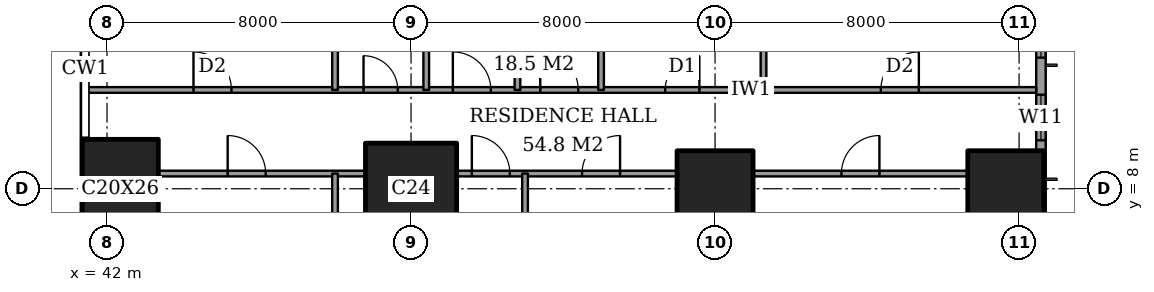
"""IFC4 building model, lengths in metres.
Left out: names, types, materials, properties, quantities, classifications, styles, units other than length and angle.
Written with IfcOpenShell. Run it as: python <this file> out.ifc"""

import sys

from ifc_helpers import new_model, si_unit, direction, frame, frame_2d, origin, origin_2d, place, context, subcontext, project, spatial, rectangle, extrude, element, fill, save


model = new_model("IFC4")
c1 = context("Model", 3, precision=1e-05, world=origin(), true_north=direction((0.0, 1.0)))
c2 = subcontext(c1, "Body", "Model", "MODEL_VIEW")
j1 = project(units=[si_unit("LENGTHUNIT", "METRE"), si_unit("PLANEANGLEUNIT", "RADIAN")], contexts=[c1])
p1 = place(None, origin())
s1 = spatial("IfcSite", under=j1, at=p1, CompositionType="ELEMENT")
p2 = place(p1, origin())
s2 = spatial("IfcBuilding", under=s1, at=p2, CompositionType="ELEMENT")
p3 = place(p2, frame((0.0, 0.0, 135.8)))
s3 = spatial("IfcBuildingStorey", under=s2, at=p3, CompositionType="ELEMENT", Elevation=135.8)
p4 = place(p3, frame((42.35, 8.0, 0.0), z_axis=(0.0, 0.0, 1.0), x_axis=(1.0, 0.0, 0.0)))
e1 = element("IfcColumn", 1, at=p4, inside=s3, PredefinedType="COLUMN", context=c2, shape_type="SweptSolid", body=[
    extrude(rectangle(XDim=2.0, YDim=2.6, at=origin_2d()), origin(), (0.0, 0.0, 1.0), 3.6),
])
p5 = place(p3, frame((50.0, 8.0, 0.0), z_axis=(0.0, 0.0, 1.0), x_axis=(1.0, 0.0, 0.0)))
e2 = element("IfcColumn", 2, at=p5, inside=s3, PredefinedType="COLUMN", context=c2, shape_type="SweptSolid", body=[
    extrude(rectangle(XDim=2.4, YDim=2.4, at=origin_2d()), origin(), (0.0, 0.0, 1.0), 3.6),
])
for number, where, z_axis, x_axis in (
    (3, (58.0, 8.0, 0.0), (0.0, 0.0, 1.0), (1.0, 0.0, 0.0)),
    (4, (65.65, 8.0, 0.0), (0.0, 0.0, 1.0), (1.0, 0.0, 0.0)),
):
    element("IfcColumn", number, at=place(p3, frame(where, z_axis=z_axis, x_axis=x_axis)), inside=s3, PredefinedType="COLUMN", context=c2, shape_type="SweptSolid", body=[
        extrude(rectangle(XDim=2.0, YDim=2.0, at=origin_2d()), origin(), (0.0, 0.0, 1.0), 3.6),
    ])
p6 = place(p3, frame((66.575, 3.175, 0.0), z_axis=(0.0, 0.0, 1.0), x_axis=(0.0, 1.0, 0.0)))
e5 = element("IfcWall", 5, at=p6, inside=s3, PredefinedType="SOLIDWALL", context=c2, shape_type="SweptSolid", body=[
    extrude(rectangle(XDim=41.65, YDim=0.25, at=frame_2d((20.825, 0.0))), origin(), (0.0, 0.0, 1.0), 3.6),
])
p7 = place(p6, frame((0.775, 0.0, 0.4)))
e6 = element("IfcOpeningElement", 6, at=p7, cuts=e5, PredefinedType="OPENING", context=c2, shape_type="SweptSolid", body=[
    extrude(rectangle(XDim=2.4, YDim=2.2, at=frame_2d((1.2, 1.1))), frame((0.0, 0.135, 0.0), z_axis=(0.0, -1.0, 0.0), x_axis=(1.0, 0.0, 0.0)), (0.0, 0.0, 1.0), 0.27),
])
p8 = place(p6, frame((6.1, 0.0, 0.4)))
e7 = element("IfcOpeningElement", 7, at=p8, cuts=e5, PredefinedType="OPENING", context=c2, shape_type="SweptSolid", body=[
    extrude(rectangle(XDim=1.2, YDim=2.2, at=frame_2d((0.6, 1.1))), frame((0.0, 0.135, 0.0), z_axis=(0.0, -1.0, 0.0), x_axis=(1.0, 0.0, 0.0)), (0.0, 0.0, 1.0), 0.27),
])
p9 = place(p6, frame((8.275, 0.0, 0.4)))
e8 = element("IfcOpeningElement", 8, at=p9, cuts=e5, PredefinedType="OPENING", context=c2, shape_type="SweptSolid", body=[
    extrude(rectangle(XDim=2.4, YDim=2.2, at=frame_2d((1.2, 1.1))), frame((0.0, 0.135, 0.0), z_axis=(0.0, -1.0, 0.0), x_axis=(1.0, 0.0, 0.0)), (0.0, 0.0, 1.0), 0.27),
])
p10 = place(p6, frame((15.775, 0.0, 0.4)))
e9 = element("IfcOpeningElement", 9, at=p10, cuts=e5, PredefinedType="OPENING", context=c2, shape_type="SweptSolid", body=[
    extrude(rectangle(XDim=2.4, YDim=2.2, at=frame_2d((1.2, 1.1))), frame((0.0, 0.135, 0.0), z_axis=(0.0, -1.0, 0.0), x_axis=(1.0, 0.0, 0.0)), (0.0, 0.0, 1.0), 0.27),
])
p11 = place(p6, frame((23.475, 0.0, 0.4)))
e10 = element("IfcOpeningElement", 10, at=p11, cuts=e5, PredefinedType="OPENING", context=c2, shape_type="SweptSolid", body=[
    extrude(rectangle(XDim=2.4, YDim=2.2, at=frame_2d((1.2, 1.1))), frame((0.0, 0.135, 0.0), z_axis=(0.0, -1.0, 0.0), x_axis=(1.0, 0.0, 0.0)), (0.0, 0.0, 1.0), 0.27),
])
p12 = place(p6, frame((30.975, 0.0, 0.4)))
e11 = element("IfcOpeningElement", 11, at=p12, cuts=e5, PredefinedType="OPENING", context=c2, shape_type="SweptSolid", body=[
    extrude(rectangle(XDim=2.4, YDim=2.2, at=frame_2d((1.2, 1.1))), frame((0.0, 0.135, 0.0), z_axis=(0.0, -1.0, 0.0), x_axis=(1.0, 0.0, 0.0)), (0.0, 0.0, 1.0), 0.27),
])
p13 = place(p6, frame((34.5, 0.0, 0.4)))
e12 = element("IfcOpeningElement", 12, at=p13, cuts=e5, PredefinedType="OPENING", context=c2, shape_type="SweptSolid", body=[
    extrude(rectangle(XDim=1.2, YDim=2.2, at=frame_2d((0.6, 1.1))), frame((0.0, 0.135, 0.0), z_axis=(0.0, -1.0, 0.0), x_axis=(1.0, 0.0, 0.0)), (0.0, 0.0, 1.0), 0.27),
])
p14 = place(p6, frame((38.475, 0.0, 0.4)))
e13 = element("IfcOpeningElement", 13, at=p14, cuts=e5, PredefinedType="OPENING", context=c2, shape_type="SweptSolid", body=[
    extrude(rectangle(XDim=2.4, YDim=2.2, at=frame_2d((1.2, 1.1))), frame((0.0, 0.135, 0.0), z_axis=(0.0, -1.0, 0.0), x_axis=(1.0, 0.0, 0.0)), (0.0, 0.0, 1.0), 0.27),
])
p15 = place(p3, frame((43.35, 8.4, 0.0), z_axis=(0.0, 0.0, 1.0), x_axis=(1.0, 0.0, 0.0)))
e14 = element("IfcWall", 14, at=p15, inside=s3, PredefinedType="PARTITIONING", context=c2, shape_type="SweptSolid", body=[
    extrude(rectangle(XDim=5.45, YDim=0.15, at=frame_2d((2.725, 0.0))), origin(), (0.0, 0.0, 1.0), 3.35),
])
p16 = place(p15, frame((1.825, 0.0, 0.0)))
e15 = element("IfcOpeningElement", 15, at=p16, cuts=e14, PredefinedType="OPENING", context=c2, shape_type="SweptSolid", body=[
    extrude(rectangle(XDim=1.0, YDim=2.1, at=frame_2d((0.5, 1.05))), frame((0.0, 0.085, 0.0), z_axis=(0.0, -1.0, 0.0), x_axis=(1.0, 0.0, 0.0)), (0.0, 0.0, 1.0), 0.17),
])
p17 = place(p3, frame((51.2, 8.4, 0.0), z_axis=(0.0, 0.0, 1.0), x_axis=(1.0, 0.0, 0.0)))
e16 = element("IfcWall", 16, at=p17, inside=s3, PredefinedType="PARTITIONING", context=c2, shape_type="SweptSolid", body=[
    extrude(rectangle(XDim=5.8, YDim=0.15, at=frame_2d((2.9, 0.0))), origin(), (0.0, 0.0, 1.0), 3.35),
])
p18 = place(p17, frame((3.3, 0.0, 0.0)))
e17 = element("IfcOpeningElement", 17, at=p18, cuts=e16, PredefinedType="OPENING", context=c2, shape_type="SweptSolid", body=[
    extrude(rectangle(XDim=1.0, YDim=2.1, at=frame_2d((0.5, 1.05))), frame((0.0, 0.085, 0.0), z_axis=(0.0, -1.0, 0.0), x_axis=(1.0, 0.0, 0.0)), (0.0, 0.0, 1.0), 0.17),
])
p19 = place(p17, frame((0.4, 0.0, 0.0)))
e18 = element("IfcOpeningElement", 18, at=p19, cuts=e16, PredefinedType="OPENING", context=c2, shape_type="SweptSolid", body=[
    extrude(rectangle(XDim=1.0, YDim=2.1, at=frame_2d((0.5, 1.05))), frame((0.0, 0.085, 0.0), z_axis=(0.0, -1.0, 0.0), x_axis=(1.0, 0.0, 0.0)), (0.0, 0.0, 1.0), 0.17),
])
p20 = place(p3, frame((59.0, 8.4, 0.0), z_axis=(0.0, 0.0, 1.0), x_axis=(1.0, 0.0, 0.0)))
e19 = element("IfcWall", 19, at=p20, inside=s3, PredefinedType="PARTITIONING", context=c2, shape_type="SweptSolid", body=[
    extrude(rectangle(XDim=5.65, YDim=0.15, at=frame_2d((2.825, 0.0))), origin(), (0.0, 0.0, 1.0), 3.35),
])
p21 = place(p20, frame((2.325, 0.0, 0.0)))
e20 = element("IfcOpeningElement", 20, at=p21, cuts=e19, PredefinedType="OPENING", context=c2, shape_type="SweptSolid", body=[
    extrude(rectangle(XDim=1.0, YDim=2.1, at=frame_2d((0.5, 1.05))), frame((0.0, 0.085, 0.0), z_axis=(0.0, -1.0, 0.0), x_axis=(1.0, 0.0, 0.0)), (0.0, 0.0, 1.0), 0.17),
])
p22 = place(p3, frame((41.439, 10.6, 0.0), z_axis=(0.0, 0.0, 1.0), x_axis=(1.0, 0.0, 0.0)))
e21 = element("IfcWall", 21, at=p22, inside=s3, PredefinedType="PARTITIONING", context=c2, shape_type="SweptSolid", body=[
    extrude(rectangle(XDim=25.011, YDim=0.15, at=frame_2d((12.505, 0.0))), origin(), (0.0, 0.0, 1.0), 3.35),
])
p23 = place(p22, frame((11.961, 0.0, 0.0)))
e22 = element("IfcOpeningElement", 22, at=p23, cuts=e21, PredefinedType="OPENING", context=c2, shape_type="SweptSolid", body=[
    extrude(rectangle(XDim=1.0, YDim=2.1, at=frame_2d((0.5, 1.05))), frame((0.0, 0.085, 0.0), z_axis=(0.0, -1.0, 0.0), x_axis=(1.0, 0.0, 0.0)), (0.0, 0.0, 1.0), 0.17),
])
p24 = place(p22, frame((20.924, 0.0, 0.0)))
e23 = element("IfcOpeningElement", 23, at=p24, cuts=e21, PredefinedType="OPENING", context=c2, shape_type="SweptSolid", body=[
    extrude(rectangle(XDim=1.0, YDim=2.1, at=frame_2d((0.5, 1.05))), frame((0.0, 0.085, 0.0), z_axis=(0.0, -1.0, 0.0), x_axis=(1.0, 0.0, 0.0)), (0.0, 0.0, 1.0), 0.17),
])
p25 = place(p22, frame((15.249, 0.0, 0.0)))
e24 = element("IfcOpeningElement", 24, at=p25, cuts=e21, PredefinedType="OPENING", context=c2, shape_type="SweptSolid", body=[
    extrude(rectangle(XDim=0.9, YDim=2.1, at=frame_2d((0.45, 1.05))), frame((0.0, 0.085, 0.0), z_axis=(0.0, -1.0, 0.0), x_axis=(1.0, 0.0, 0.0)), (0.0, 0.0, 1.0), 0.17),
])
p26 = place(p22, frame((9.661, 0.0, 0.0)))
e25 = element("IfcOpeningElement", 25, at=p26, cuts=e21, PredefinedType="OPENING", context=c2, shape_type="SweptSolid", body=[
    extrude(rectangle(XDim=1.0, YDim=2.1, at=frame_2d((0.5, 1.05))), frame((0.0, 0.085, 0.0), z_axis=(0.0, -1.0, 0.0), x_axis=(1.0, 0.0, 0.0)), (0.0, 0.0, 1.0), 0.17),
])
p27 = place(p22, frame((7.311, 0.0, 0.0)))
e26 = element("IfcOpeningElement", 26, at=p27, cuts=e21, PredefinedType="OPENING", context=c2, shape_type="SweptSolid", body=[
    extrude(rectangle(XDim=0.9, YDim=2.1, at=frame_2d((0.45, 1.05))), frame((0.0, 0.085, 0.0), z_axis=(0.0, -1.0, 0.0), x_axis=(1.0, 0.0, 0.0)), (0.0, 0.0, 1.0), 0.17),
])
p28 = place(p22, frame((2.836, 0.0, 0.0)))
e27 = element("IfcOpeningElement", 27, at=p28, cuts=e21, PredefinedType="OPENING", context=c2, shape_type="SweptSolid", body=[
    extrude(rectangle(XDim=1.0, YDim=2.1, at=frame_2d((0.5, 1.05))), frame((0.0, 0.085, 0.0), z_axis=(0.0, -1.0, 0.0), x_axis=(1.0, 0.0, 0.0)), (0.0, 0.0, 1.0), 0.17),
])
p29 = place(p3, frame((48.0, -0.45, 0.0), z_axis=(0.0, 0.0, 1.0), x_axis=(0.0, 1.0, 0.0)))
e28 = element("IfcWall", 28, at=p29, inside=s3, PredefinedType="PARTITIONING", context=c2, shape_type="SweptSolid", body=[
    extrude(rectangle(XDim=8.85, YDim=0.15, at=frame_2d((4.425, 0.0))), origin(), (0.0, 0.0, 1.0), 3.35),
])
p30 = place(p3, frame((48.0, 10.6, 0.0), z_axis=(0.0, 0.0, 1.0), x_axis=(0.0, 1.0, 0.0)))
e29 = element("IfcWall", 29, at=p30, inside=s3, PredefinedType="PARTITIONING", context=c2, shape_type="SweptSolid", body=[
    extrude(rectangle(XDim=8.4, YDim=0.15, at=frame_2d((4.2, 0.0))), origin(), (0.0, 0.0, 1.0), 3.35),
])
p31 = place(p30, frame((6.7, 0.0, 0.0)))
e30 = element("IfcOpeningElement", 30, at=p31, cuts=e29, PredefinedType="OPENING", context=c2, shape_type="SweptSolid", body=[
    extrude(rectangle(XDim=0.9, YDim=2.1, at=frame_2d((0.45, 1.05))), frame((0.0, 0.085, 0.0), z_axis=(0.0, -1.0, 0.0), x_axis=(1.0, 0.0, 0.0)), (0.0, 0.0, 1.0), 0.17),
])
p32 = place(p3, frame((50.4, 10.6, 0.0), z_axis=(0.0, 0.0, 1.0), x_axis=(0.0, 1.0, 0.0)))
e31 = element("IfcWall", 31, at=p32, inside=s3, PredefinedType="PARTITIONING", context=c2, shape_type="SweptSolid", body=[
    extrude(rectangle(XDim=4.2, YDim=0.15, at=frame_2d((2.1, 0.0))), origin(), (0.0, 0.0, 1.0), 3.35),
])
p33 = place(p3, frame((52.8, 10.6, 0.0), z_axis=(0.0, 0.0, 1.0), x_axis=(0.0, 1.0, 0.0)))
e32 = element("IfcWall", 32, at=p33, inside=s3, PredefinedType="PARTITIONING", context=c2, shape_type="SweptSolid", body=[
    extrude(rectangle(XDim=8.4, YDim=0.15, at=frame_2d((4.2, 0.0))), origin(), (0.0, 0.0, 1.0), 3.35),
])
p34 = place(p3, frame((53.0, -0.45, 0.0), z_axis=(0.0, 0.0, 1.0), x_axis=(0.0, 1.0, 0.0)))
e33 = element("IfcWall", 33, at=p34, inside=s3, PredefinedType="PARTITIONING", context=c2, shape_type="SweptSolid", body=[
    extrude(rectangle(XDim=8.85, YDim=0.15, at=frame_2d((4.425, 0.0))), origin(), (0.0, 0.0, 1.0), 3.35),
])
p35 = place(p3, frame((55.0, 10.6, 0.0), z_axis=(0.0, 0.0, 1.0), x_axis=(0.0, 1.0, 0.0)))
e34 = element("IfcWall", 34, at=p35, inside=s3, PredefinedType="PARTITIONING", context=c2, shape_type="SweptSolid", body=[
    extrude(rectangle(XDim=11.0, YDim=0.15, at=frame_2d((5.5, 0.0))), origin(), (0.0, 0.0, 1.0), 3.35),
])
p36 = place(p35, frame((9.2, 0.0, 0.0)))
e35 = element("IfcOpeningElement", 35, at=p36, cuts=e34, PredefinedType="OPENING", context=c2, shape_type="SweptSolid", body=[
    extrude(rectangle(XDim=1.0, YDim=2.1, at=frame_2d((0.5, 1.05))), frame((0.0, 0.085, 0.0), z_axis=(0.0, -1.0, 0.0), x_axis=(1.0, 0.0, 0.0)), (0.0, 0.0, 1.0), 0.17),
])
p37 = place(p3, frame((59.275, 10.6, 0.0), z_axis=(0.0, 0.0, 1.0), x_axis=(0.0, 1.0, 0.0)))
e36 = element("IfcWall", 36, at=p37, inside=s3, PredefinedType="PARTITIONING", context=c2, shape_type="SweptSolid", body=[
    extrude(rectangle(XDim=4.2, YDim=0.15, at=frame_2d((2.1, 0.0))), origin(), (0.0, 0.0, 1.0), 3.35),
])
p38 = place(p8, origin())
e37 = element("IfcWindow", 37, at=p38, inside=s3, PartitioningType="SINGLE_PANEL", PredefinedType="WINDOW", context=c2, shape_type="SweptSolid", body=[
    extrude(rectangle(XDim=1.2, YDim=2.2, at=frame_2d((0.6, 1.1))), frame((0.0, 0.03, 0.0), z_axis=(0.0, -1.0, 0.0), x_axis=(1.0, 0.0, 0.0)), (0.0, 0.0, 1.0), 0.06),
])
fill(e7, e37)
p39 = place(p9, origin())
e38 = element("IfcWindow", 38, at=p39, inside=s3, PartitioningType="SINGLE_PANEL", PredefinedType="WINDOW", context=c2, shape_type="SweptSolid", body=[
    extrude(rectangle(XDim=2.4, YDim=2.2, at=frame_2d((1.2, 1.1))), frame((0.0, 0.03, 0.0), z_axis=(0.0, -1.0, 0.0), x_axis=(1.0, 0.0, 0.0)), (0.0, 0.0, 1.0), 0.06),
])
fill(e8, e38)
p40 = place(p21, origin())
e39 = element("IfcDoor", 39, at=p40, inside=s3, OperationType="SINGLE_SWING_LEFT", PredefinedType="DOOR", context=c2, shape_type="SweptSolid", body=[
    extrude(rectangle(XDim=1.0, YDim=2.1, at=frame_2d((0.5, 1.05))), frame((0.0, 0.025, 0.0), z_axis=(0.0, -1.0, 0.0), x_axis=(1.0, 0.0, 0.0)), (0.0, 0.0, 1.0), 0.05),
])
fill(e20, e39)
p41 = place(p18, origin())
e40 = element("IfcDoor", 40, at=p41, inside=s3, OperationType="SINGLE_SWING_LEFT", PredefinedType="DOOR", context=c2, shape_type="SweptSolid", body=[
    extrude(rectangle(XDim=1.0, YDim=2.1, at=frame_2d((0.5, 1.05))), frame((0.0, 0.025, 0.0), z_axis=(0.0, -1.0, 0.0), x_axis=(1.0, 0.0, 0.0)), (0.0, 0.0, 1.0), 0.05),
])
fill(e17, e40)
p42 = place(p19, origin())
e41 = element("IfcDoor", 41, at=p42, inside=s3, OperationType="SINGLE_SWING_RIGHT", PredefinedType="DOOR", context=c2, shape_type="SweptSolid", body=[
    extrude(rectangle(XDim=1.0, YDim=2.1, at=frame_2d((0.5, 1.05))), frame((0.0, 0.025, 0.0), z_axis=(0.0, -1.0, 0.0), x_axis=(1.0, 0.0, 0.0)), (0.0, 0.0, 1.0), 0.05),
])
fill(e18, e41)
p43 = place(p16, origin())
e42 = element("IfcDoor", 42, at=p43, inside=s3, OperationType="SINGLE_SWING_RIGHT", PredefinedType="DOOR", context=c2, shape_type="SweptSolid", body=[
    extrude(rectangle(XDim=1.0, YDim=2.1, at=frame_2d((0.5, 1.05))), frame((0.0, 0.025, 0.0), z_axis=(0.0, -1.0, 0.0), x_axis=(1.0, 0.0, 0.0)), (0.0, 0.0, 1.0), 0.05),
])
fill(e15, e42)
p44 = place(p23, origin())
e43 = element("IfcDoor", 43, at=p44, inside=s3, OperationType="SINGLE_SWING_RIGHT", PredefinedType="DOOR", context=c2, shape_type="SweptSolid", body=[
    extrude(rectangle(XDim=1.0, YDim=2.1, at=frame_2d((0.5, 1.05))), frame((0.0, 0.025, 0.0), z_axis=(0.0, -1.0, 0.0), x_axis=(1.0, 0.0, 0.0)), (0.0, 0.0, 1.0), 0.05),
])
fill(e22, e43)
p45 = place(p24, origin())
e44 = element("IfcDoor", 44, at=p45, inside=s3, OperationType="SINGLE_SWING_LEFT", PredefinedType="DOOR", context=c2, shape_type="SweptSolid", body=[
    extrude(rectangle(XDim=1.0, YDim=2.1, at=frame_2d((0.5, 1.05))), frame((0.0, 0.025, 0.0), z_axis=(0.0, -1.0, 0.0), x_axis=(1.0, 0.0, 0.0)), (0.0, 0.0, 1.0), 0.05),
])
fill(e23, e44)
p46 = place(p25, origin())
e45 = element("IfcDoor", 45, at=p46, inside=s3, OperationType="SINGLE_SWING_LEFT", PredefinedType="DOOR", context=c2, shape_type="SweptSolid", body=[
    extrude(rectangle(XDim=0.9, YDim=2.1, at=frame_2d((0.45, 1.05))), frame((0.0, 0.025, 0.0), z_axis=(0.0, -1.0, 0.0), x_axis=(1.0, 0.0, 0.0)), (0.0, 0.0, 1.0), 0.05),
])
fill(e24, e45)
p47 = place(p26, origin())
e46 = element("IfcDoor", 46, at=p47, inside=s3, OperationType="SINGLE_SWING_RIGHT", PredefinedType="DOOR", context=c2, shape_type="SweptSolid", body=[
    extrude(rectangle(XDim=1.0, YDim=2.1, at=frame_2d((0.5, 1.05))), frame((0.0, 0.025, 0.0), z_axis=(0.0, -1.0, 0.0), x_axis=(1.0, 0.0, 0.0)), (0.0, 0.0, 1.0), 0.05),
])
fill(e25, e46)
p48 = place(p27, origin())
e47 = element("IfcDoor", 47, at=p48, inside=s3, OperationType="SINGLE_SWING_RIGHT", PredefinedType="DOOR", context=c2, shape_type="SweptSolid", body=[
    extrude(rectangle(XDim=0.9, YDim=2.1, at=frame_2d((0.45, 1.05))), frame((0.0, 0.025, 0.0), z_axis=(0.0, -1.0, 0.0), x_axis=(1.0, 0.0, 0.0)), (0.0, 0.0, 1.0), 0.05),
])
fill(e26, e47)
p49 = place(p28, origin())
e48 = element("IfcDoor", 48, at=p49, inside=s3, OperationType="SINGLE_SWING_RIGHT", PredefinedType="DOOR", context=c2, shape_type="SweptSolid", body=[
    extrude(rectangle(XDim=1.0, YDim=2.1, at=frame_2d((0.5, 1.05))), frame((0.0, 0.025, 0.0), z_axis=(0.0, -1.0, 0.0), x_axis=(1.0, 0.0, 0.0)), (0.0, 0.0, 1.0), 0.05),
])
fill(e27, e48)
save(model, sys.argv[1])
